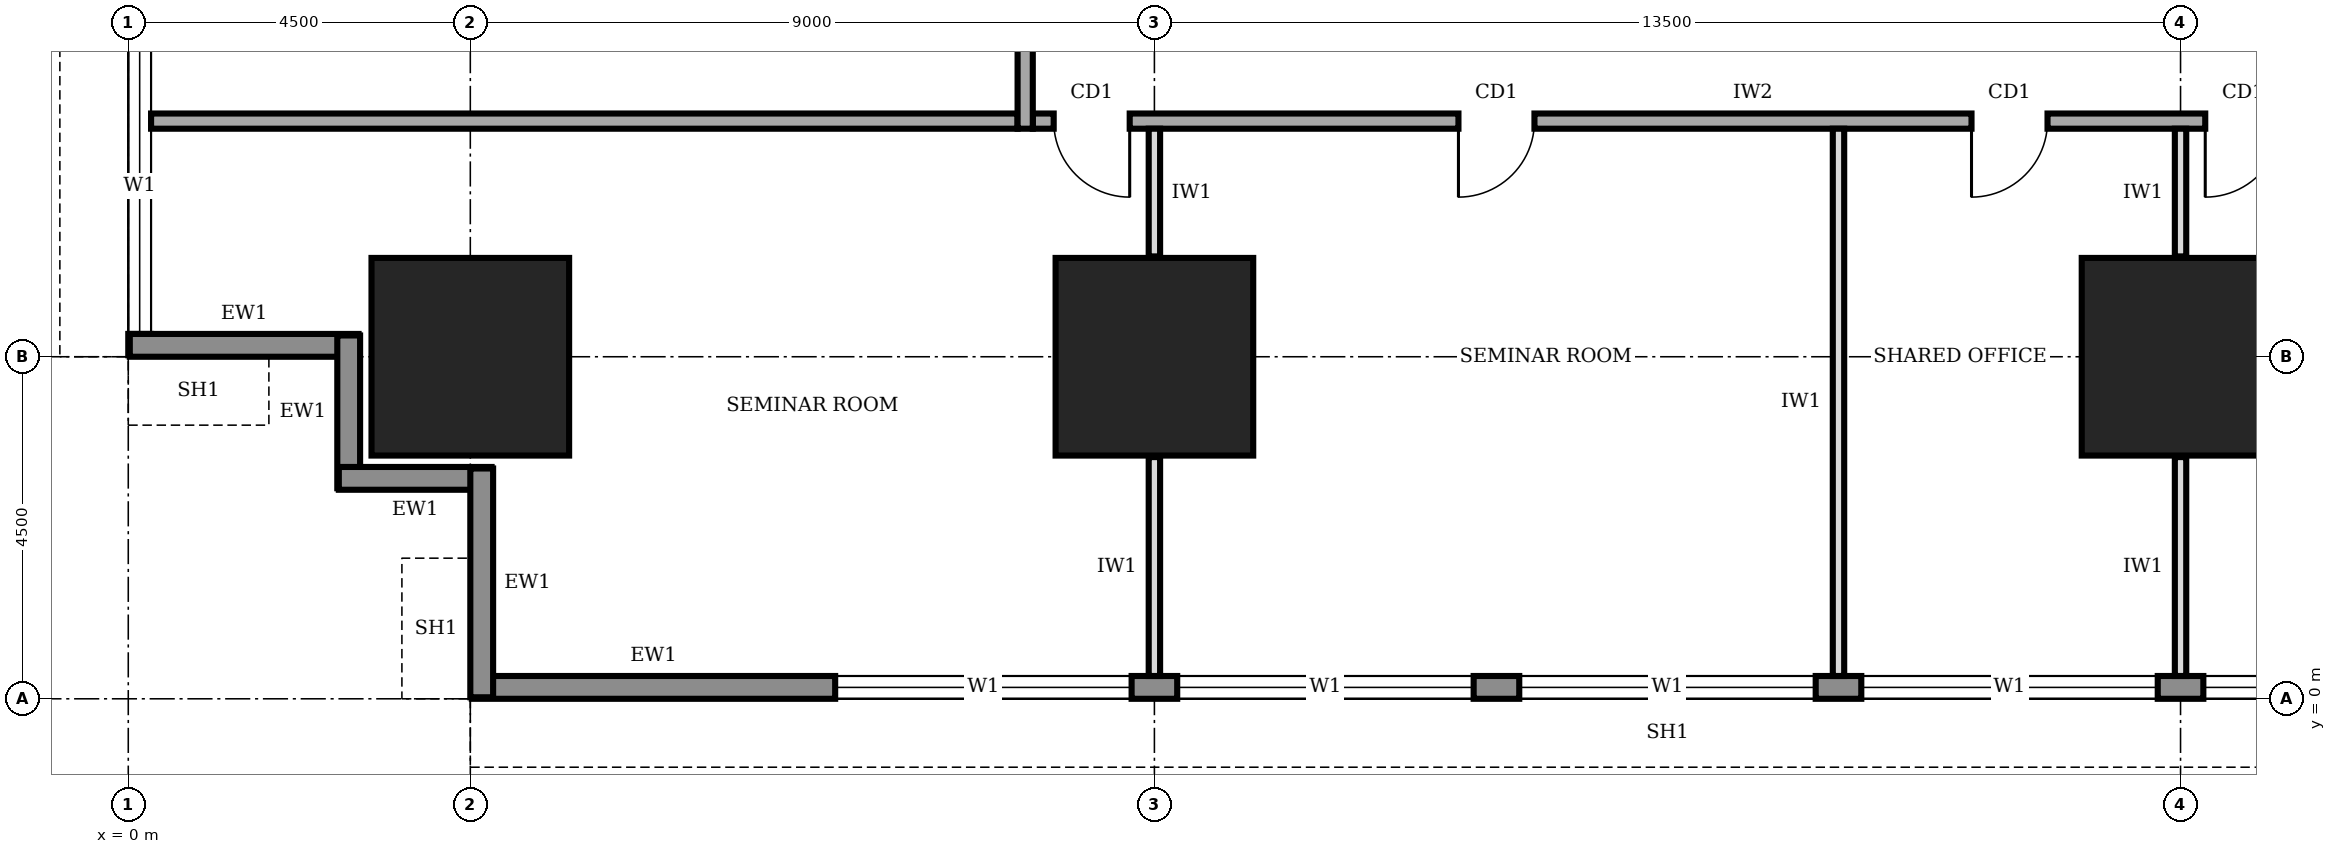
"""IFC4 building model, lengths in metres.
Left out: names, types, materials, properties, quantities, classifications, styles, units other than length and angle.
Written with IfcOpenShell. Run it as: python <this file> out.ifc"""

import sys

from ifc_helpers import new_model, si_unit, direction, frame, frame_2d, origin, origin_2d, place, context, subcontext, project, spatial, rectangle, extrude, element, fill, save


model = new_model("IFC4")
c1 = context("Model", 3, precision=1e-05, world=origin(), true_north=direction((0.0, 1.0)))
c2 = subcontext(c1, "Body", "Model", "MODEL_VIEW")
j1 = project(units=[si_unit("LENGTHUNIT", "METRE"), si_unit("PLANEANGLEUNIT", "RADIAN")], contexts=[c1])
p1 = place(None, origin())
s1 = spatial("IfcSite", under=j1, at=p1, CompositionType="ELEMENT")
p2 = place(p1, origin())
s2 = spatial("IfcBuilding", under=s1, at=p2, CompositionType="ELEMENT")
p3 = place(p2, frame((0.0, 0.0, 29.0)))
s3 = spatial("IfcBuildingStorey", under=s2, at=p3, CompositionType="ELEMENT", Elevation=29.0)
for number, where, z_axis, x_axis in (
    (1, (4.5, 4.5, 0.0), (0.0, 0.0, 1.0), (1.0, 0.0, 0.0)),
    (2, (13.5, 4.5, 0.0), (0.0, 0.0, 1.0), (1.0, 0.0, 0.0)),
    (3, (27.0, 4.5, 0.0), (0.0, 0.0, 1.0), (1.0, 0.0, 0.0)),
):
    element("IfcColumn", number, at=place(p3, frame(where, z_axis=z_axis, x_axis=x_axis)), inside=s3, PredefinedType="COLUMN", context=c2, shape_type="SweptSolid", body=[
        extrude(rectangle(XDim=2.6, YDim=2.6, at=origin_2d()), origin(), (0.0, 0.0, 1.0), 4.0),
    ])
p4 = place(p3, frame((4.52, 0.15, 0.0), z_axis=(0.0, 0.0, 1.0), x_axis=(1.0, 0.0, 0.0)))
e4 = element("IfcWall", 4, at=p4, inside=s3, PredefinedType="STANDARD", context=c2, shape_type="SweptSolid", body=[
    extrude(rectangle(XDim=31.46, YDim=0.3, at=frame_2d((15.73, 0.0))), origin(), (0.0, 0.0, 1.0), 3.75),
])
p5 = place(p4, frame((4.78, 0.0, 0.9)))
e5 = element("IfcOpeningElement", 5, at=p5, cuts=e4, PredefinedType="OPENING", context=c2, shape_type="SweptSolid", body=[
    extrude(rectangle(XDim=3.9, YDim=2.2, at=frame_2d((1.95, 1.1))), frame((0.0, 0.16, 0.0), z_axis=(0.0, -1.0, 0.0), x_axis=(1.0, 0.0, 0.0)), (0.0, 0.0, 1.0), 0.32),
])
p6 = place(p4, frame((9.28, 0.0, 0.9)))
e6 = element("IfcOpeningElement", 6, at=p6, cuts=e4, PredefinedType="OPENING", context=c2, shape_type="SweptSolid", body=[
    extrude(rectangle(XDim=3.9, YDim=2.2, at=frame_2d((1.95, 1.1))), frame((0.0, 0.16, 0.0), z_axis=(0.0, -1.0, 0.0), x_axis=(1.0, 0.0, 0.0)), (0.0, 0.0, 1.0), 0.32),
])
p7 = place(p4, frame((13.78, 0.0, 0.9)))
e7 = element("IfcOpeningElement", 7, at=p7, cuts=e4, PredefinedType="OPENING", context=c2, shape_type="SweptSolid", body=[
    extrude(rectangle(XDim=3.9, YDim=2.2, at=frame_2d((1.95, 1.1))), frame((0.0, 0.16, 0.0), z_axis=(0.0, -1.0, 0.0), x_axis=(1.0, 0.0, 0.0)), (0.0, 0.0, 1.0), 0.32),
])
p8 = place(p4, frame((18.28, 0.0, 0.9)))
e8 = element("IfcOpeningElement", 8, at=p8, cuts=e4, PredefinedType="OPENING", context=c2, shape_type="SweptSolid", body=[
    extrude(rectangle(XDim=3.9, YDim=2.2, at=frame_2d((1.95, 1.1))), frame((0.0, 0.16, 0.0), z_axis=(0.0, -1.0, 0.0), x_axis=(1.0, 0.0, 0.0)), (0.0, 0.0, 1.0), 0.32),
])
p9 = place(p4, frame((22.78, 0.0, 0.9)))
e9 = element("IfcOpeningElement", 9, at=p9, cuts=e4, PredefinedType="OPENING", context=c2, shape_type="SweptSolid", body=[
    extrude(rectangle(XDim=3.9, YDim=2.2, at=frame_2d((1.95, 1.1))), frame((0.0, 0.16, 0.0), z_axis=(0.0, -1.0, 0.0), x_axis=(1.0, 0.0, 0.0)), (0.0, 0.0, 1.0), 0.32),
])
p10 = place(p4, frame((27.28, 0.0, 0.9)))
e10 = element("IfcOpeningElement", 10, at=p10, cuts=e4, PredefinedType="OPENING", context=c2, shape_type="SweptSolid", body=[
    extrude(rectangle(XDim=3.9, YDim=2.2, at=frame_2d((1.95, 1.1))), frame((0.0, 0.16, 0.0), z_axis=(0.0, -1.0, 0.0), x_axis=(1.0, 0.0, 0.0)), (0.0, 0.0, 1.0), 0.32),
])
p11 = place(p3, frame((0.15, 35.98, 0.0), z_axis=(0.0, 0.0, 1.0), x_axis=(0.0, -1.0, 0.0)))
e11 = element("IfcWall", 11, at=p11, inside=s3, PredefinedType="STANDARD", context=c2, shape_type="SweptSolid", body=[
    extrude(rectangle(XDim=31.46, YDim=0.3, at=frame_2d((15.73, 0.0))), origin(), (0.0, 0.0, 1.0), 3.75),
])
p12 = place(p11, frame((27.28, 0.0, 0.9)))
e12 = element("IfcOpeningElement", 12, at=p12, cuts=e11, PredefinedType="OPENING", context=c2, shape_type="SweptSolid", body=[
    extrude(rectangle(XDim=3.9, YDim=2.2, at=frame_2d((1.95, 1.1))), frame((0.0, 0.16, 0.0), z_axis=(0.0, -1.0, 0.0), x_axis=(1.0, 0.0, 0.0)), (0.0, 0.0, 1.0), 0.32),
])
p13 = place(p11, frame((22.78, 0.0, 0.9)))
e13 = element("IfcOpeningElement", 13, at=p13, cuts=e11, PredefinedType="OPENING", context=c2, shape_type="SweptSolid", body=[
    extrude(rectangle(XDim=3.9, YDim=2.2, at=frame_2d((1.95, 1.1))), frame((0.0, 0.16, 0.0), z_axis=(0.0, -1.0, 0.0), x_axis=(1.0, 0.0, 0.0)), (0.0, 0.0, 1.0), 0.32),
])
p14 = place(p11, frame((18.28, 0.0, 0.9)))
e14 = element("IfcOpeningElement", 14, at=p14, cuts=e11, PredefinedType="OPENING", context=c2, shape_type="SweptSolid", body=[
    extrude(rectangle(XDim=3.9, YDim=2.2, at=frame_2d((1.95, 1.1))), frame((0.0, 0.16, 0.0), z_axis=(0.0, -1.0, 0.0), x_axis=(1.0, 0.0, 0.0)), (0.0, 0.0, 1.0), 0.32),
])
p15 = place(p11, frame((13.78, 0.0, 0.9)))
e15 = element("IfcOpeningElement", 15, at=p15, cuts=e11, PredefinedType="OPENING", context=c2, shape_type="SweptSolid", body=[
    extrude(rectangle(XDim=3.9, YDim=2.2, at=frame_2d((1.95, 1.1))), frame((0.0, 0.16, 0.0), z_axis=(0.0, -1.0, 0.0), x_axis=(1.0, 0.0, 0.0)), (0.0, 0.0, 1.0), 0.32),
])
p16 = place(p11, frame((9.28, 0.0, 0.9)))
e16 = element("IfcOpeningElement", 16, at=p16, cuts=e11, PredefinedType="OPENING", context=c2, shape_type="SweptSolid", body=[
    extrude(rectangle(XDim=3.9, YDim=2.2, at=frame_2d((1.95, 1.1))), frame((0.0, 0.16, 0.0), z_axis=(0.0, -1.0, 0.0), x_axis=(1.0, 0.0, 0.0)), (0.0, 0.0, 1.0), 0.32),
])
p17 = place(p11, frame((4.78, 0.0, 0.9)))
e17 = element("IfcOpeningElement", 17, at=p17, cuts=e11, PredefinedType="OPENING", context=c2, shape_type="SweptSolid", body=[
    extrude(rectangle(XDim=3.9, YDim=2.2, at=frame_2d((1.95, 1.1))), frame((0.0, 0.16, 0.0), z_axis=(0.0, -1.0, 0.0), x_axis=(1.0, 0.0, 0.0)), (0.0, 0.0, 1.0), 0.32),
])
p18 = place(p3, frame((0.02, 4.65, 0.0), z_axis=(0.0, 0.0, 1.0), x_axis=(1.0, 0.0, 0.0)))
e18 = element("IfcWall", 18, at=p18, inside=s3, PredefinedType="STANDARD", context=c2, shape_type="SweptSolid", body=[
    extrude(rectangle(XDim=3.01, YDim=0.3, at=frame_2d((1.505, 0.0))), origin(), (0.0, 0.0, 1.0), 2.85),
])
for number, where, z_axis, x_axis in (
    (19, (2.9, 4.78, 0.0), (0.0, 0.0, 1.0), (0.0, -1.0, 0.0)),
    (20, (2.77, 2.9, 0.0), (0.0, 0.0, 1.0), (1.0, 0.0, 0.0)),
):
    element("IfcWall", number, at=place(p3, frame(where, z_axis=z_axis, x_axis=x_axis)), inside=s3, PredefinedType="STANDARD", context=c2, shape_type="SweptSolid", body=[
        extrude(rectangle(XDim=2.01, YDim=0.3, at=frame_2d((1.005, 0.0))), origin(), (0.0, 0.0, 1.0), 3.75),
    ])
p19 = place(p3, frame((4.65, 3.03, 0.0), z_axis=(0.0, 0.0, 1.0), x_axis=(0.0, -1.0, 0.0)))
e21 = element("IfcWall", 21, at=p19, inside=s3, PredefinedType="STANDARD", context=c2, shape_type="SweptSolid", body=[
    extrude(rectangle(XDim=3.01, YDim=0.3, at=frame_2d((1.505, 0.0))), origin(), (0.0, 0.0, 1.0), 2.85),
])
p20 = place(p3, frame((11.9, 7.6, 0.0), z_axis=(0.0, 0.0, 1.0), x_axis=(1.0, 0.0, 0.0)))
e22 = element("IfcWall", 22, at=p20, inside=s3, PredefinedType="SOLIDWALL", context=c2, shape_type="SweptSolid", body=[
    extrude(rectangle(XDim=16.9, YDim=0.2, at=frame_2d((8.45, 0.0))), origin(), (0.0, 0.0, 1.0), 3.75),
])
p21 = place(p20, frame((0.275, 0.0, 0.0)))
e23 = element("IfcOpeningElement", 23, at=p21, cuts=e22, PredefinedType="OPENING", context=c2, shape_type="SweptSolid", body=[
    extrude(rectangle(XDim=1.0, YDim=2.1, at=frame_2d((0.5, 1.05))), frame((0.0, 0.11, 0.0), z_axis=(0.0, -1.0, 0.0), x_axis=(1.0, 0.0, 0.0)), (0.0, 0.0, 1.0), 0.22),
])
p22 = place(p20, frame((5.6, 0.0, 0.0)))
e24 = element("IfcOpeningElement", 24, at=p22, cuts=e22, PredefinedType="OPENING", context=c2, shape_type="SweptSolid", body=[
    extrude(rectangle(XDim=1.0, YDim=2.1, at=frame_2d((0.5, 1.05))), frame((0.0, 0.11, 0.0), z_axis=(0.0, -1.0, 0.0), x_axis=(1.0, 0.0, 0.0)), (0.0, 0.0, 1.0), 0.22),
])
p23 = place(p20, frame((12.35, 0.0, 0.0)))
e25 = element("IfcOpeningElement", 25, at=p23, cuts=e22, PredefinedType="OPENING", context=c2, shape_type="SweptSolid", body=[
    extrude(rectangle(XDim=1.0, YDim=2.1, at=frame_2d((0.5, 1.05))), frame((0.0, 0.11, 0.0), z_axis=(0.0, -1.0, 0.0), x_axis=(1.0, 0.0, 0.0)), (0.0, 0.0, 1.0), 0.22),
])
p24 = place(p20, frame((15.425, 0.0, 0.0)))
e26 = element("IfcOpeningElement", 26, at=p24, cuts=e22, PredefinedType="OPENING", context=c2, shape_type="SweptSolid", body=[
    extrude(rectangle(XDim=1.0, YDim=2.1, at=frame_2d((0.5, 1.05))), frame((0.0, 0.11, 0.0), z_axis=(0.0, -1.0, 0.0), x_axis=(1.0, 0.0, 0.0)), (0.0, 0.0, 1.0), 0.22),
])
p25 = place(p3, frame((11.8, 31.3, 0.0), z_axis=(0.0, 0.0, 1.0), x_axis=(0.0, -1.0, 0.0)))
e27 = element("IfcWall", 27, at=p25, inside=s3, PredefinedType="SOLIDWALL", context=c2, shape_type="SweptSolid", body=[
    extrude(rectangle(XDim=23.8, YDim=0.2, at=frame_2d((11.9, 0.0))), origin(), (0.0, 0.0, 1.0), 3.75),
])
p26 = place(p25, frame((20.3, 0.0, 0.0)))
e28 = element("IfcOpeningElement", 28, at=p26, cuts=e27, PredefinedType="OPENING", context=c2, shape_type="SweptSolid", body=[
    extrude(rectangle(XDim=1.0, YDim=2.1, at=frame_2d((0.5, 1.05))), frame((0.0, 0.11, 0.0), z_axis=(0.0, -1.0, 0.0), x_axis=(1.0, 0.0, 0.0)), (0.0, 0.0, 1.0), 0.22),
])
p27 = place(p25, frame((16.2, 0.0, 0.0)))
e29 = element("IfcOpeningElement", 29, at=p27, cuts=e27, PredefinedType="OPENING", context=c2, shape_type="SweptSolid", body=[
    extrude(rectangle(XDim=1.0, YDim=2.1, at=frame_2d((0.5, 1.05))), frame((0.0, 0.11, 0.0), z_axis=(0.0, -1.0, 0.0), x_axis=(1.0, 0.0, 0.0)), (0.0, 0.0, 1.0), 0.22),
])
p28 = place(p25, frame((13.2, 0.0, 0.0)))
e30 = element("IfcOpeningElement", 30, at=p28, cuts=e27, PredefinedType="OPENING", context=c2, shape_type="SweptSolid", body=[
    extrude(rectangle(XDim=0.9, YDim=2.1, at=frame_2d((0.45, 1.05))), frame((0.0, 0.11, 0.0), z_axis=(0.0, -1.0, 0.0), x_axis=(1.0, 0.0, 0.0)), (0.0, 0.0, 1.0), 0.22),
])
p29 = place(p25, frame((10.15, 0.0, 0.0)))
e31 = element("IfcOpeningElement", 31, at=p29, cuts=e27, PredefinedType="OPENING", context=c2, shape_type="SweptSolid", body=[
    extrude(rectangle(XDim=0.9, YDim=2.1, at=frame_2d((0.45, 1.05))), frame((0.0, 0.11, 0.0), z_axis=(0.0, -1.0, 0.0), x_axis=(1.0, 0.0, 0.0)), (0.0, 0.0, 1.0), 0.22),
])
p30 = place(p25, frame((5.45, 0.0, 0.0)))
e32 = element("IfcOpeningElement", 32, at=p30, cuts=e27, PredefinedType="OPENING", context=c2, shape_type="SweptSolid", body=[
    extrude(rectangle(XDim=0.9, YDim=2.1, at=frame_2d((0.45, 1.05))), frame((0.0, 0.11, 0.0), z_axis=(0.0, -1.0, 0.0), x_axis=(1.0, 0.0, 0.0)), (0.0, 0.0, 1.0), 0.22),
])
p31 = place(p25, frame((8.0, 0.0, 0.0)))
e33 = element("IfcOpeningElement", 33, at=p31, cuts=e27, PredefinedType="OPENING", context=c2, shape_type="SweptSolid", body=[
    extrude(rectangle(XDim=1.0, YDim=2.1, at=frame_2d((0.5, 1.05))), frame((0.0, 0.11, 0.0), z_axis=(0.0, -1.0, 0.0), x_axis=(1.0, 0.0, 0.0)), (0.0, 0.0, 1.0), 0.22),
])
p32 = place(p25, frame((1.55, 0.0, 0.0)))
e34 = element("IfcOpeningElement", 34, at=p32, cuts=e27, PredefinedType="OPENING", context=c2, shape_type="SweptSolid", body=[
    extrude(rectangle(XDim=1.0, YDim=2.1, at=frame_2d((0.5, 1.05))), frame((0.0, 0.11, 0.0), z_axis=(0.0, -1.0, 0.0), x_axis=(1.0, 0.0, 0.0)), (0.0, 0.0, 1.0), 0.22),
])
p33 = place(p3, frame((0.3, 7.6, 0.0), z_axis=(0.0, 0.0, 1.0), x_axis=(1.0, 0.0, 0.0)))
e35 = element("IfcWall", 35, at=p33, inside=s3, PredefinedType="SOLIDWALL", context=c2, shape_type="SweptSolid", body=[
    extrude(rectangle(XDim=11.4, YDim=0.2, at=frame_2d((5.7, 0.0))), origin(), (0.0, 0.0, 1.0), 3.75),
])
p34 = place(p3, frame((13.5, 0.3, 0.0), z_axis=(0.0, 0.0, 1.0), x_axis=(0.0, 1.0, 0.0)))
e36 = element("IfcWall", 36, at=p34, inside=s3, PredefinedType="PARTITIONING", context=c2, shape_type="SweptSolid", body=[
    extrude(rectangle(XDim=2.88, YDim=0.15, at=frame_2d((1.44, 0.0))), origin(), (0.0, 0.0, 1.0), 2.85),
])
p35 = place(p3, frame((13.5, 5.82, 0.0), z_axis=(0.0, 0.0, 1.0), x_axis=(0.0, 1.0, 0.0)))
e37 = element("IfcWall", 37, at=p35, inside=s3, PredefinedType="PARTITIONING", context=c2, shape_type="SweptSolid", body=[
    extrude(rectangle(XDim=1.68, YDim=0.15, at=frame_2d((0.84, 0.0))), origin(), (0.0, 0.0, 1.0), 2.85),
])
p36 = place(p3, frame((22.5, 0.3, 0.0), z_axis=(0.0, 0.0, 1.0), x_axis=(0.0, 1.0, 0.0)))
e38 = element("IfcWall", 38, at=p36, inside=s3, PredefinedType="PARTITIONING", context=c2, shape_type="SweptSolid", body=[
    extrude(rectangle(XDim=7.2, YDim=0.15, at=frame_2d((3.6, 0.0))), origin(), (0.0, 0.0, 1.0), 3.75),
])
p37 = place(p3, frame((27.0, 0.3, 0.0), z_axis=(0.0, 0.0, 1.0), x_axis=(0.0, 1.0, 0.0)))
e39 = element("IfcWall", 39, at=p37, inside=s3, PredefinedType="PARTITIONING", context=c2, shape_type="SweptSolid", body=[
    extrude(rectangle(XDim=2.88, YDim=0.15, at=frame_2d((1.44, 0.0))), origin(), (0.0, 0.0, 1.0), 2.85),
])
p38 = place(p3, frame((27.0, 5.82, 0.0), z_axis=(0.0, 0.0, 1.0), x_axis=(0.0, 1.0, 0.0)))
e40 = element("IfcWall", 40, at=p38, inside=s3, PredefinedType="PARTITIONING", context=c2, shape_type="SweptSolid", body=[
    extrude(rectangle(XDim=1.68, YDim=0.15, at=frame_2d((0.84, 0.0))), origin(), (0.0, 0.0, 1.0), 2.85),
])
p39 = place(p5, origin())
e41 = element("IfcWindow", 41, at=p39, inside=s3, PartitioningType="SINGLE_PANEL", PredefinedType="WINDOW", context=c2, shape_type="SweptSolid", body=[
    extrude(rectangle(XDim=3.9, YDim=2.2, at=frame_2d((1.95, 1.1))), frame((0.0, 0.03, 0.0), z_axis=(0.0, -1.0, 0.0), x_axis=(1.0, 0.0, 0.0)), (0.0, 0.0, 1.0), 0.06),
])
fill(e5, e41)
p40 = place(p6, origin())
e42 = element("IfcWindow", 42, at=p40, inside=s3, PartitioningType="SINGLE_PANEL", PredefinedType="WINDOW", context=c2, shape_type="SweptSolid", body=[
    extrude(rectangle(XDim=3.9, YDim=2.2, at=frame_2d((1.95, 1.1))), frame((0.0, 0.03, 0.0), z_axis=(0.0, -1.0, 0.0), x_axis=(1.0, 0.0, 0.0)), (0.0, 0.0, 1.0), 0.06),
])
fill(e6, e42)
p41 = place(p7, origin())
e43 = element("IfcWindow", 43, at=p41, inside=s3, PartitioningType="SINGLE_PANEL", PredefinedType="WINDOW", context=c2, shape_type="SweptSolid", body=[
    extrude(rectangle(XDim=3.9, YDim=2.2, at=frame_2d((1.95, 1.1))), frame((0.0, 0.03, 0.0), z_axis=(0.0, -1.0, 0.0), x_axis=(1.0, 0.0, 0.0)), (0.0, 0.0, 1.0), 0.06),
])
fill(e7, e43)
p42 = place(p8, origin())
e44 = element("IfcWindow", 44, at=p42, inside=s3, PartitioningType="SINGLE_PANEL", PredefinedType="WINDOW", context=c2, shape_type="SweptSolid", body=[
    extrude(rectangle(XDim=3.9, YDim=2.2, at=frame_2d((1.95, 1.1))), frame((0.0, 0.03, 0.0), z_axis=(0.0, -1.0, 0.0), x_axis=(1.0, 0.0, 0.0)), (0.0, 0.0, 1.0), 0.06),
])
fill(e8, e44)
p43 = place(p9, origin())
e45 = element("IfcWindow", 45, at=p43, inside=s3, PartitioningType="SINGLE_PANEL", PredefinedType="WINDOW", context=c2, shape_type="SweptSolid", body=[
    extrude(rectangle(XDim=3.9, YDim=2.2, at=frame_2d((1.95, 1.1))), frame((0.0, 0.03, 0.0), z_axis=(0.0, -1.0, 0.0), x_axis=(1.0, 0.0, 0.0)), (0.0, 0.0, 1.0), 0.06),
])
fill(e9, e45)
p44 = place(p12, origin())
e46 = element("IfcWindow", 46, at=p44, inside=s3, PartitioningType="SINGLE_PANEL", PredefinedType="WINDOW", context=c2, shape_type="SweptSolid", body=[
    extrude(rectangle(XDim=3.9, YDim=2.2, at=frame_2d((1.95, 1.1))), frame((0.0, 0.03, 0.0), z_axis=(0.0, -1.0, 0.0), x_axis=(1.0, 0.0, 0.0)), (0.0, 0.0, 1.0), 0.06),
])
fill(e12, e46)
p45 = place(p21, frame((1.0, 0.0, 0.0), z_axis=(0.0, 0.0, 1.0), x_axis=(-1.0, 0.0, 0.0)))
e47 = element("IfcDoor", 47, at=p45, inside=s3, OperationType="SINGLE_SWING_LEFT", PredefinedType="DOOR", context=c2, shape_type="SweptSolid", body=[
    extrude(rectangle(XDim=1.0, YDim=2.1, at=frame_2d((0.5, 1.05))), frame((0.0, 0.025, 0.0), z_axis=(0.0, -1.0, 0.0), x_axis=(1.0, 0.0, 0.0)), (0.0, 0.0, 1.0), 0.05),
])
fill(e23, e47)
p46 = place(p22, frame((1.0, 0.0, 0.0), z_axis=(0.0, 0.0, 1.0), x_axis=(-1.0, 0.0, 0.0)))
e48 = element("IfcDoor", 48, at=p46, inside=s3, OperationType="SINGLE_SWING_RIGHT", PredefinedType="DOOR", context=c2, shape_type="SweptSolid", body=[
    extrude(rectangle(XDim=1.0, YDim=2.1, at=frame_2d((0.5, 1.05))), frame((0.0, 0.025, 0.0), z_axis=(0.0, -1.0, 0.0), x_axis=(1.0, 0.0, 0.0)), (0.0, 0.0, 1.0), 0.05),
])
fill(e24, e48)
p47 = place(p23, frame((1.0, 0.0, 0.0), z_axis=(0.0, 0.0, 1.0), x_axis=(-1.0, 0.0, 0.0)))
e49 = element("IfcDoor", 49, at=p47, inside=s3, OperationType="SINGLE_SWING_RIGHT", PredefinedType="DOOR", context=c2, shape_type="SweptSolid", body=[
    extrude(rectangle(XDim=1.0, YDim=2.1, at=frame_2d((0.5, 1.05))), frame((0.0, 0.025, 0.0), z_axis=(0.0, -1.0, 0.0), x_axis=(1.0, 0.0, 0.0)), (0.0, 0.0, 1.0), 0.05),
])
fill(e25, e49)
p48 = place(p24, frame((1.0, 0.0, 0.0), z_axis=(0.0, 0.0, 1.0), x_axis=(-1.0, 0.0, 0.0)))
e50 = element("IfcDoor", 50, at=p48, inside=s3, OperationType="SINGLE_SWING_RIGHT", PredefinedType="DOOR", context=c2, shape_type="SweptSolid", body=[
    extrude(rectangle(XDim=1.0, YDim=2.1, at=frame_2d((0.5, 1.05))), frame((0.0, 0.025, 0.0), z_axis=(0.0, -1.0, 0.0), x_axis=(1.0, 0.0, 0.0)), (0.0, 0.0, 1.0), 0.05),
])
fill(e26, e50)
save(model, sys.argv[1])
